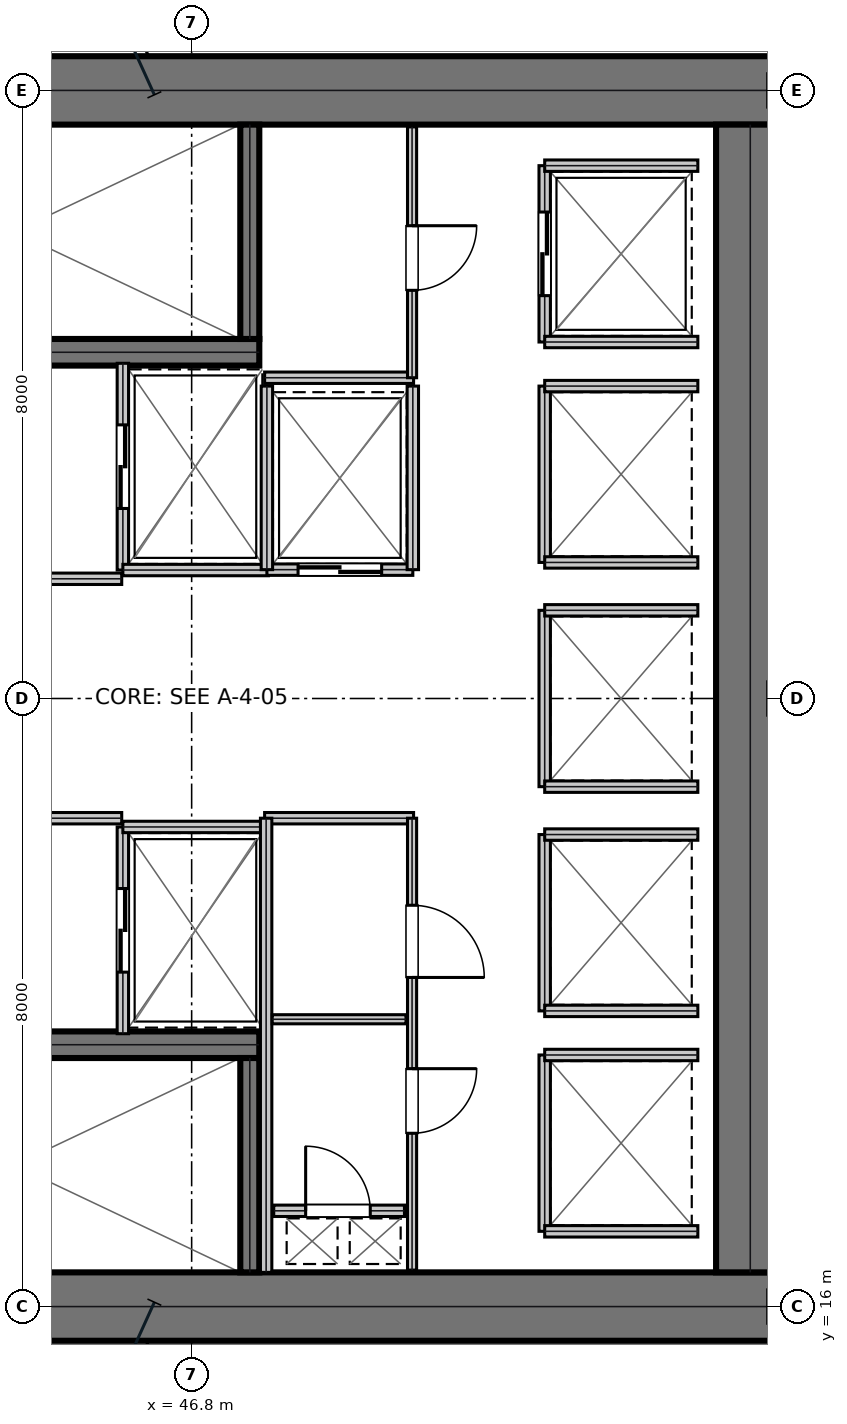
"""IFC4 building model, lengths in metres.
Left out: names, types, materials, properties, quantities, classifications, styles, units other than length and angle.
Written with IfcOpenShell. Run it as: python <this file> out.ifc"""

import sys

from ifc_helpers import new_model, si_unit, direction, frame, frame_2d, origin, place, context, subcontext, project, spatial, rectangle, extrude, element, fill, save


model = new_model("IFC4")
c1 = context("Model", 3, precision=1e-05, world=origin(), true_north=direction((0.0, 1.0)))
c2 = subcontext(c1, "Body", "Model", "MODEL_VIEW")
j1 = project(units=[si_unit("LENGTHUNIT", "METRE"), si_unit("PLANEANGLEUNIT", "RADIAN")], contexts=[c1])
p1 = place(None, origin())
s1 = spatial("IfcSite", under=j1, at=p1, CompositionType="ELEMENT")
p2 = place(p1, origin())
s2 = spatial("IfcBuilding", under=s1, at=p2, CompositionType="ELEMENT")
p3 = place(p2, frame((0.0, 0.0, 102.6)))
s3 = spatial("IfcBuildingStorey", under=s2, at=p3, CompositionType="ELEMENT", Elevation=102.6)
for number, where, z_axis, x_axis in (
    (1, (38.8, 32.0, 0.0), (0.0, 0.0, 1.0), (1.0, 0.0, 0.0)),
    (2, (38.8, 16.0, 0.0), (0.0, 0.0, 1.0), (1.0, 0.0, 0.0)),
):
    element("IfcWall", number, at=place(p3, frame(where, z_axis=z_axis, x_axis=x_axis)), inside=s3, PredefinedType="SHEAR", context=c2, shape_type="SweptSolid", body=[
        extrude(rectangle(XDim=16.0, YDim=0.9, at=frame_2d((8.0, 0.0))), origin(), (0.0, 0.0, 1.0), 3.73),
    ])
p4 = place(p3, frame((54.15, 16.45, 0.0), z_axis=(0.0, 0.0, 1.0), x_axis=(0.0, 1.0, 0.0)))
e3 = element("IfcWall", 3, at=p4, inside=s3, PredefinedType="SHEAR", context=c2, shape_type="SweptSolid", body=[
    extrude(rectangle(XDim=15.1, YDim=0.9, at=frame_2d((7.55, 0.0))), origin(), (0.0, 0.0, 1.0), 3.73),
])
p5 = place(p3, frame((39.98, 28.555, 0.0), z_axis=(0.0, 0.0, 1.0), x_axis=(1.0, 0.0, 0.0)))
e4 = element("IfcWall", 4, at=p5, inside=s3, PredefinedType="SHEAR", context=c2, shape_type="SweptSolid", body=[
    extrude(rectangle(XDim=7.71, YDim=0.35, at=frame_2d((3.855, 0.0))), origin(), (0.0, 0.0, 1.0), 3.73),
])
p6 = place(p5, frame((0.25, 0.0, 0.0)))
e5 = element("IfcOpeningElement", 5, at=p6, cuts=e4, PredefinedType="OPENING", context=c2, shape_type="SweptSolid", body=[
    extrude(rectangle(XDim=1.1, YDim=2.15, at=frame_2d((0.55, 1.075))), frame((0.0, 0.185, 0.0), z_axis=(0.0, -1.0, 0.0), x_axis=(1.0, 0.0, 0.0)), (0.0, 0.0, 1.0), 0.37),
])
p7 = place(p3, frame((39.98, 19.445, 0.0), z_axis=(0.0, 0.0, 1.0), x_axis=(1.0, 0.0, 0.0)))
e6 = element("IfcWall", 6, at=p7, inside=s3, PredefinedType="SHEAR", context=c2, shape_type="SweptSolid", body=[
    extrude(rectangle(XDim=7.71, YDim=0.35, at=frame_2d((3.855, 0.0))), origin(), (0.0, 0.0, 1.0), 3.73),
])
p8 = place(p7, frame((0.25, 0.0, 0.0)))
e7 = element("IfcOpeningElement", 7, at=p8, cuts=e6, PredefinedType="OPENING", context=c2, shape_type="SweptSolid", body=[
    extrude(rectangle(XDim=1.1, YDim=2.15, at=frame_2d((0.55, 1.075))), frame((0.0, 0.185, 0.0), z_axis=(0.0, -1.0, 0.0), x_axis=(1.0, 0.0, 0.0)), (0.0, 0.0, 1.0), 0.37),
])
for number, where, z_axis, x_axis in (
    (8, (47.565, 28.73, 0.0), (0.0, 0.0, 1.0), (0.0, 1.0, 0.0)),
    (9, (47.565, 16.45, 0.0), (0.0, 0.0, 1.0), (0.0, 1.0, 0.0)),
):
    element("IfcWall", number, at=place(p3, frame(where, z_axis=z_axis, x_axis=x_axis)), inside=s3, PredefinedType="SHEAR", context=c2, shape_type="SweptSolid", body=[
        extrude(rectangle(XDim=2.82, YDim=0.25, at=frame_2d((1.41, 0.0))), origin(), (0.0, 0.0, 1.0), 3.73),
    ])
p9 = place(p3, frame((39.98, 25.575, 0.0), z_axis=(0.0, 0.0, 1.0), x_axis=(1.0, 0.0, 0.0)))
e10 = element("IfcWall", 10, at=p9, inside=s3, PredefinedType="PARTITIONING", context=c2, shape_type="SweptSolid", body=[
    extrude(rectangle(XDim=5.9, YDim=0.15, at=frame_2d((2.95, 0.0))), origin(), (0.0, 0.0, 1.0), 3.73),
])
p10 = place(p9, frame((2.35, 0.0, 0.0)))
e11 = element("IfcOpeningElement", 11, at=p10, cuts=e10, PredefinedType="OPENING", context=c2, shape_type="SweptSolid", body=[
    extrude(rectangle(XDim=1.05, YDim=2.15, at=frame_2d((0.525, 1.075))), frame((0.0, 0.085, 0.0), z_axis=(0.0, -1.0, 0.0), x_axis=(1.0, 0.0, 0.0)), (0.0, 0.0, 1.0), 0.17),
])
p11 = place(p3, frame((39.98, 22.425, 0.0), z_axis=(0.0, 0.0, 1.0), x_axis=(1.0, 0.0, 0.0)))
e12 = element("IfcWall", 12, at=p11, inside=s3, PredefinedType="PARTITIONING", context=c2, shape_type="SweptSolid", body=[
    extrude(rectangle(XDim=5.9, YDim=0.15, at=frame_2d((2.95, 0.0))), origin(), (0.0, 0.0, 1.0), 3.73),
])
p12 = place(p11, frame((2.35, 0.0, 0.0)))
e13 = element("IfcOpeningElement", 13, at=p12, cuts=e12, PredefinedType="OPENING", context=c2, shape_type="SweptSolid", body=[
    extrude(rectangle(XDim=1.05, YDim=2.15, at=frame_2d((0.525, 1.075))), frame((0.0, 0.085, 0.0), z_axis=(0.0, -1.0, 0.0), x_axis=(1.0, 0.0, 0.0)), (0.0, 0.0, 1.0), 0.17),
])
p13 = place(p3, frame((45.895, 25.69, 0.0), z_axis=(0.0, 0.0, 1.0), x_axis=(0.0, 1.0, 0.0)))
e14 = element("IfcWall", 14, at=p13, inside=s3, PredefinedType="PARTITIONING", context=c2, shape_type="SweptSolid", body=[
    extrude(rectangle(XDim=2.72, YDim=0.15, at=frame_2d((1.36, 0.0))), origin(), (0.0, 0.0, 1.0), 3.73),
])
p14 = place(p13, frame((0.81, 0.0, 0.0)))
e15 = element("IfcOpeningElement", 15, at=p14, cuts=e14, PredefinedType="OPENING", context=c2, shape_type="SweptSolid", body=[
    extrude(rectangle(XDim=1.1, YDim=2.15, at=frame_2d((0.55, 1.075))), frame((0.0, 0.085, 0.0), z_axis=(0.0, -1.0, 0.0), x_axis=(1.0, 0.0, 0.0)), (0.0, 0.0, 1.0), 0.17),
])
p15 = place(p3, frame((45.895, 25.69, 0.0), z_axis=(0.0, 0.0, 1.0), x_axis=(1.0, 0.0, 0.0)))
e16 = element("IfcWall", 16, at=p15, inside=s3, PredefinedType="PARTITIONING", context=c2, shape_type="SweptSolid", body=[
    extrude(rectangle(XDim=1.915, YDim=0.15, at=frame_2d((0.958, 0.0))), origin(), (0.0, 0.0, 1.0), 3.73),
])
p16 = place(p3, frame((45.895, 19.59, 0.0), z_axis=(0.0, 0.0, 1.0), x_axis=(0.0, 1.0, 0.0)))
e17 = element("IfcWall", 17, at=p16, inside=s3, PredefinedType="PARTITIONING", context=c2, shape_type="SweptSolid", body=[
    extrude(rectangle(XDim=2.72, YDim=0.15, at=frame_2d((1.36, 0.0))), origin(), (0.0, 0.0, 1.0), 3.73),
])
p17 = place(p16, frame((0.81, 0.0, 0.0)))
e18 = element("IfcOpeningElement", 18, at=p17, cuts=e17, PredefinedType="OPENING", context=c2, shape_type="SweptSolid", body=[
    extrude(rectangle(XDim=1.1, YDim=2.15, at=frame_2d((0.55, 1.075))), frame((0.0, 0.085, 0.0), z_axis=(0.0, -1.0, 0.0), x_axis=(1.0, 0.0, 0.0)), (0.0, 0.0, 1.0), 0.17),
])
p18 = place(p3, frame((45.895, 22.31, 0.0), z_axis=(0.0, 0.0, 1.0), x_axis=(1.0, 0.0, 0.0)))
e19 = element("IfcWall", 19, at=p18, inside=s3, PredefinedType="PARTITIONING", context=c2, shape_type="SweptSolid", body=[
    extrude(rectangle(XDim=1.915, YDim=0.15, at=frame_2d((0.958, 0.0))), origin(), (0.0, 0.0, 1.0), 3.73),
])
p19 = place(p3, frame((47.79, 25.695, 0.0), z_axis=(0.0, 0.0, 1.0), x_axis=(1.0, 0.0, 0.0)))
e20 = element("IfcWall", 20, at=p19, inside=s3, PredefinedType="PARTITIONING", context=c2, shape_type="SweptSolid", body=[
    extrude(rectangle(XDim=1.92, YDim=0.15, at=frame_2d((0.96, 0.0))), origin(), (0.0, 0.0, 1.0), 3.73),
])
p20 = place(p19, frame((0.41, 0.0, 0.0)))
e21 = element("IfcOpeningElement", 21, at=p20, cuts=e20, PredefinedType="OPENING", context=c2, shape_type="SweptSolid", body=[
    extrude(rectangle(XDim=1.1, YDim=2.15, at=frame_2d((0.55, 1.075))), frame((0.0, 0.085, 0.0), z_axis=(0.0, -1.0, 0.0), x_axis=(1.0, 0.0, 0.0)), (0.0, 0.0, 1.0), 0.17),
])
for number, where, z_axis, x_axis in (
    (22, (47.79, 25.695, 0.0), (0.0, 0.0, 1.0), (0.0, 1.0, 0.0)),
    (23, (49.71, 25.695, 0.0), (0.0, 0.0, 1.0), (0.0, 1.0, 0.0)),
):
    element("IfcWall", number, at=place(p3, frame(where, z_axis=z_axis, x_axis=x_axis)), inside=s3, PredefinedType="PARTITIONING", context=c2, shape_type="SweptSolid", body=[
        extrude(rectangle(XDim=2.415, YDim=0.15, at=frame_2d((1.208, 0.0))), origin(), (0.0, 0.0, 1.0), 3.73),
    ])
p21 = place(p3, frame((51.445, 28.69, 0.0), z_axis=(0.0, 0.0, 1.0), x_axis=(0.0, 1.0, 0.0)))
e24 = element("IfcWall", 24, at=p21, inside=s3, PredefinedType="PARTITIONING", context=c2, shape_type="SweptSolid", body=[
    extrude(rectangle(XDim=2.32, YDim=0.15, at=frame_2d((1.16, 0.0))), origin(), (0.0, 0.0, 1.0), 3.73),
])
p22 = place(p21, frame((0.61, 0.0, 0.0)))
e25 = element("IfcOpeningElement", 25, at=p22, cuts=e24, PredefinedType="OPENING", context=c2, shape_type="SweptSolid", body=[
    extrude(rectangle(XDim=1.1, YDim=2.15, at=frame_2d((0.55, 1.075))), frame((0.0, 0.085, 0.0), z_axis=(0.0, -1.0, 0.0), x_axis=(1.0, 0.0, 0.0)), (0.0, 0.0, 1.0), 0.17),
])
for number, where, z_axis, x_axis in (
    (26, (51.445, 28.69, 0.0), (0.0, 0.0, 1.0), (1.0, 0.0, 0.0)),
    (27, (51.445, 31.01, 0.0), (0.0, 0.0, 1.0), (1.0, 0.0, 0.0)),
):
    element("IfcWall", number, at=place(p3, frame(where, z_axis=z_axis, x_axis=x_axis)), inside=s3, PredefinedType="PARTITIONING", context=c2, shape_type="SweptSolid", body=[
        extrude(rectangle(XDim=2.015, YDim=0.15, at=frame_2d((1.007, 0.0))), origin(), (0.0, 0.0, 1.0), 3.73),
    ])
p23 = place(p3, frame((51.445, 25.79, 0.0), z_axis=(0.0, 0.0, 1.0), x_axis=(0.0, 1.0, 0.0)))
e28 = element("IfcWall", 28, at=p23, inside=s3, PredefinedType="PARTITIONING", context=c2, shape_type="SweptSolid", body=[
    extrude(rectangle(XDim=2.32, YDim=0.15, at=frame_2d((1.16, 0.0))), origin(), (0.0, 0.0, 1.0), 3.73),
])
for number, where, z_axis, x_axis in (
    (29, (51.445, 25.79, 0.0), (0.0, 0.0, 1.0), (1.0, 0.0, 0.0)),
    (30, (51.445, 28.11, 0.0), (0.0, 0.0, 1.0), (1.0, 0.0, 0.0)),
):
    element("IfcWall", number, at=place(p3, frame(where, z_axis=z_axis, x_axis=x_axis)), inside=s3, PredefinedType="PARTITIONING", context=c2, shape_type="SweptSolid", body=[
        extrude(rectangle(XDim=2.015, YDim=0.15, at=frame_2d((1.007, 0.0))), origin(), (0.0, 0.0, 1.0), 3.73),
    ])
p24 = place(p3, frame((51.445, 19.89, 0.0), z_axis=(0.0, 0.0, 1.0), x_axis=(0.0, 1.0, 0.0)))
e31 = element("IfcWall", 31, at=p24, inside=s3, PredefinedType="PARTITIONING", context=c2, shape_type="SweptSolid", body=[
    extrude(rectangle(XDim=2.32, YDim=0.15, at=frame_2d((1.16, 0.0))), origin(), (0.0, 0.0, 1.0), 3.73),
])
for number, where, z_axis, x_axis in (
    (32, (51.445, 19.89, 0.0), (0.0, 0.0, 1.0), (1.0, 0.0, 0.0)),
    (33, (51.445, 22.21, 0.0), (0.0, 0.0, 1.0), (1.0, 0.0, 0.0)),
):
    element("IfcWall", number, at=place(p3, frame(where, z_axis=z_axis, x_axis=x_axis)), inside=s3, PredefinedType="PARTITIONING", context=c2, shape_type="SweptSolid", body=[
        extrude(rectangle(XDim=2.015, YDim=0.15, at=frame_2d((1.007, 0.0))), origin(), (0.0, 0.0, 1.0), 3.73),
    ])
p25 = place(p3, frame((51.445, 22.84, 0.0), z_axis=(0.0, 0.0, 1.0), x_axis=(0.0, 1.0, 0.0)))
e34 = element("IfcWall", 34, at=p25, inside=s3, PredefinedType="PARTITIONING", context=c2, shape_type="SweptSolid", body=[
    extrude(rectangle(XDim=2.32, YDim=0.15, at=frame_2d((1.16, 0.0))), origin(), (0.0, 0.0, 1.0), 3.73),
])
for number, where, z_axis, x_axis in (
    (35, (51.445, 22.84, 0.0), (0.0, 0.0, 1.0), (1.0, 0.0, 0.0)),
    (36, (51.445, 25.16, 0.0), (0.0, 0.0, 1.0), (1.0, 0.0, 0.0)),
):
    element("IfcWall", number, at=place(p3, frame(where, z_axis=z_axis, x_axis=x_axis)), inside=s3, PredefinedType="PARTITIONING", context=c2, shape_type="SweptSolid", body=[
        extrude(rectangle(XDim=2.015, YDim=0.15, at=frame_2d((1.007, 0.0))), origin(), (0.0, 0.0, 1.0), 3.73),
    ])
p26 = place(p3, frame((51.445, 16.99, 0.0), z_axis=(0.0, 0.0, 1.0), x_axis=(0.0, 1.0, 0.0)))
e37 = element("IfcWall", 37, at=p26, inside=s3, PredefinedType="PARTITIONING", context=c2, shape_type="SweptSolid", body=[
    extrude(rectangle(XDim=2.32, YDim=0.15, at=frame_2d((1.16, 0.0))), origin(), (0.0, 0.0, 1.0), 3.73),
])
for number, where, z_axis, x_axis in (
    (38, (51.445, 16.99, 0.0), (0.0, 0.0, 1.0), (1.0, 0.0, 0.0)),
    (39, (51.445, 19.31, 0.0), (0.0, 0.0, 1.0), (1.0, 0.0, 0.0)),
):
    element("IfcWall", number, at=place(p3, frame(where, z_axis=z_axis, x_axis=x_axis)), inside=s3, PredefinedType="PARTITIONING", context=c2, shape_type="SweptSolid", body=[
        extrude(rectangle(XDim=2.015, YDim=0.15, at=frame_2d((1.007, 0.0))), origin(), (0.0, 0.0, 1.0), 3.73),
    ])
p27 = place(p3, frame((47.88, 17.26, 0.0), z_axis=(0.0, 0.0, 1.0), x_axis=(1.0, 0.0, 0.0)))
e40 = element("IfcWall", 40, at=p27, inside=s3, PredefinedType="PARTITIONING", context=c2, shape_type="SweptSolid", body=[
    extrude(rectangle(XDim=1.72, YDim=0.15, at=frame_2d((0.86, 0.0))), origin(), (0.0, 0.0, 1.0), 3.73),
])
p28 = place(p27, frame((0.42, 0.0, 0.0)))
e41 = element("IfcOpeningElement", 41, at=p28, cuts=e40, PredefinedType="OPENING", context=c2, shape_type="SweptSolid", body=[
    extrude(rectangle(XDim=0.85, YDim=2.15, at=frame_2d((0.425, 1.075))), frame((0.0, 0.085, 0.0), z_axis=(0.0, -1.0, 0.0), x_axis=(1.0, 0.0, 0.0)), (0.0, 0.0, 1.0), 0.17),
])
p29 = place(p3, frame((47.76, 22.425, 0.0), z_axis=(0.0, 0.0, 1.0), x_axis=(1.0, 0.0, 0.0)))
e42 = element("IfcWall", 42, at=p29, inside=s3, PredefinedType="PARTITIONING", context=c2, shape_type="SweptSolid", body=[
    extrude(rectangle(XDim=1.96, YDim=0.15, at=frame_2d((0.98, 0.0))), origin(), (0.0, 0.0, 1.0), 3.73),
])
p30 = place(p3, frame((47.78, 16.45, 0.0), z_axis=(0.0, 0.0, 1.0), x_axis=(0.0, 1.0, 0.0)))
e43 = element("IfcWall", 43, at=p30, inside=s3, PredefinedType="PARTITIONING", context=c2, shape_type="SweptSolid", body=[
    extrude(rectangle(XDim=5.975, YDim=0.15, at=frame_2d((2.988, 0.0))), origin(), (0.0, 0.0, 1.0), 3.73),
])
p31 = place(p3, frame((47.86, 19.78, 0.0), z_axis=(0.0, 0.0, 1.0), x_axis=(1.0, 0.0, 0.0)))
e44 = element("IfcWall", 44, at=p31, inside=s3, PredefinedType="PARTITIONING", context=c2, shape_type="SweptSolid", body=[
    extrude(rectangle(XDim=1.76, YDim=0.12, at=frame_2d((0.88, 0.0))), origin(), (0.0, 0.0, 1.0), 3.73),
])
p32 = place(p3, frame((49.7, 16.48, 0.0), z_axis=(0.0, 0.0, 1.0), x_axis=(0.0, 1.0, 0.0)))
e45 = element("IfcWall", 45, at=p32, inside=s3, PredefinedType="PARTITIONING", context=c2, shape_type="SweptSolid", body=[
    extrude(rectangle(XDim=5.945, YDim=0.12, at=frame_2d((2.973, 0.0))), origin(), (0.0, 0.0, 1.0), 3.73),
])
p33 = place(p32, frame((1.8, 0.0, 0.0)))
e46 = element("IfcOpeningElement", 46, at=p33, cuts=e45, PredefinedType="OPENING", context=c2, shape_type="SweptSolid", body=[
    extrude(rectangle(XDim=0.85, YDim=2.15, at=frame_2d((0.425, 1.075))), frame((0.0, 0.07, 0.0), z_axis=(0.0, -1.0, 0.0), x_axis=(1.0, 0.0, 0.0)), (0.0, 0.0, 1.0), 0.14),
])
p34 = place(p32, frame((3.85, 0.0, 0.0)))
e47 = element("IfcOpeningElement", 47, at=p34, cuts=e45, PredefinedType="OPENING", context=c2, shape_type="SweptSolid", body=[
    extrude(rectangle(XDim=0.95, YDim=2.15, at=frame_2d((0.475, 1.075))), frame((0.0, 0.07, 0.0), z_axis=(0.0, -1.0, 0.0), x_axis=(1.0, 0.0, 0.0)), (0.0, 0.0, 1.0), 0.14),
])
p35 = place(p3, frame((47.76, 28.22, 0.0), z_axis=(0.0, 0.0, 1.0), x_axis=(1.0, 0.0, 0.0)))
e48 = element("IfcWall", 48, at=p35, inside=s3, PredefinedType="PARTITIONING", context=c2, shape_type="SweptSolid", body=[
    extrude(rectangle(XDim=1.96, YDim=0.15, at=frame_2d((0.98, 0.0))), origin(), (0.0, 0.0, 1.0), 3.73),
])
p36 = place(p3, frame((49.7, 28.22, 0.0), z_axis=(0.0, 0.0, 1.0), x_axis=(0.0, 1.0, 0.0)))
e49 = element("IfcWall", 49, at=p36, inside=s3, PredefinedType="PARTITIONING", context=c2, shape_type="SweptSolid", body=[
    extrude(rectangle(XDim=3.3, YDim=0.12, at=frame_2d((1.65, 0.0))), origin(), (0.0, 0.0, 1.0), 3.73),
])
p37 = place(p36, frame((1.15, 0.0, 0.0)))
e50 = element("IfcOpeningElement", 50, at=p37, cuts=e49, PredefinedType="OPENING", context=c2, shape_type="SweptSolid", body=[
    extrude(rectangle(XDim=0.85, YDim=2.15, at=frame_2d((0.425, 1.075))), frame((0.0, 0.07, 0.0), z_axis=(0.0, -1.0, 0.0), x_axis=(1.0, 0.0, 0.0)), (0.0, 0.0, 1.0), 0.14),
])
p38 = place(p14, frame((1.1, 0.0, 0.0), z_axis=(0.0, 0.0, 1.0), x_axis=(-1.0, 0.0, 0.0)))
e51 = element("IfcDoor", 51, at=p38, inside=s3, OperationType="DOUBLE_DOOR_SLIDING", PredefinedType="DOOR", context=c2, shape_type="SweptSolid", body=[
    extrude(rectangle(XDim=1.1, YDim=2.15, at=frame_2d((0.55, 1.075))), frame((0.0, 0.025, 0.0), z_axis=(0.0, -1.0, 0.0), x_axis=(1.0, 0.0, 0.0)), (0.0, 0.0, 1.0), 0.05),
])
fill(e15, e51)
p39 = place(p17, frame((1.1, 0.0, 0.0), z_axis=(0.0, 0.0, 1.0), x_axis=(-1.0, 0.0, 0.0)))
e52 = element("IfcDoor", 52, at=p39, inside=s3, OperationType="DOUBLE_DOOR_SLIDING", PredefinedType="DOOR", context=c2, shape_type="SweptSolid", body=[
    extrude(rectangle(XDim=1.1, YDim=2.15, at=frame_2d((0.55, 1.075))), frame((0.0, 0.025, 0.0), z_axis=(0.0, -1.0, 0.0), x_axis=(1.0, 0.0, 0.0)), (0.0, 0.0, 1.0), 0.05),
])
fill(e18, e52)
p40 = place(p20, frame((1.1, 0.0, 0.0), z_axis=(0.0, 0.0, 1.0), x_axis=(-1.0, 0.0, 0.0)))
e53 = element("IfcDoor", 53, at=p40, inside=s3, OperationType="DOUBLE_DOOR_SLIDING", PredefinedType="DOOR", context=c2, shape_type="SweptSolid", body=[
    extrude(rectangle(XDim=1.1, YDim=2.15, at=frame_2d((0.55, 1.075))), frame((0.0, 0.025, 0.0), z_axis=(0.0, -1.0, 0.0), x_axis=(1.0, 0.0, 0.0)), (0.0, 0.0, 1.0), 0.05),
])
fill(e21, e53)
p41 = place(p22, frame((1.1, 0.0, 0.0), z_axis=(0.0, 0.0, 1.0), x_axis=(-1.0, 0.0, 0.0)))
e54 = element("IfcDoor", 54, at=p41, inside=s3, OperationType="DOUBLE_DOOR_SLIDING", PredefinedType="DOOR", context=c2, shape_type="SweptSolid", body=[
    extrude(rectangle(XDim=1.1, YDim=2.15, at=frame_2d((0.55, 1.075))), frame((0.0, 0.025, 0.0), z_axis=(0.0, -1.0, 0.0), x_axis=(1.0, 0.0, 0.0)), (0.0, 0.0, 1.0), 0.05),
])
fill(e25, e54)
p42 = place(p28, origin())
e55 = element("IfcDoor", 55, at=p42, inside=s3, OperationType="SINGLE_SWING_LEFT", PredefinedType="TRAPDOOR", context=c2, shape_type="SweptSolid", body=[
    extrude(rectangle(XDim=0.85, YDim=2.15, at=frame_2d((0.425, 1.075))), frame((0.0, 0.025, 0.0), z_axis=(0.0, -1.0, 0.0), x_axis=(1.0, 0.0, 0.0)), (0.0, 0.0, 1.0), 0.05),
])
fill(e41, e55)
p43 = place(p33, frame((0.85, 0.0, 0.0), z_axis=(0.0, 0.0, 1.0), x_axis=(-1.0, 0.0, 0.0)))
e56 = element("IfcDoor", 56, at=p43, inside=s3, OperationType="SINGLE_SWING_LEFT", PredefinedType="DOOR", context=c2, shape_type="SweptSolid", body=[
    extrude(rectangle(XDim=0.85, YDim=2.15, at=frame_2d((0.425, 1.075))), frame((0.0, 0.025, 0.0), z_axis=(0.0, -1.0, 0.0), x_axis=(1.0, 0.0, 0.0)), (0.0, 0.0, 1.0), 0.05),
])
fill(e46, e56)
p44 = place(p34, frame((0.95, 0.0, 0.0), z_axis=(0.0, 0.0, 1.0), x_axis=(-1.0, 0.0, 0.0)))
e57 = element("IfcDoor", 57, at=p44, inside=s3, OperationType="SINGLE_SWING_RIGHT", PredefinedType="DOOR", context=c2, shape_type="SweptSolid", body=[
    extrude(rectangle(XDim=0.95, YDim=2.15, at=frame_2d((0.475, 1.075))), frame((0.0, 0.025, 0.0), z_axis=(0.0, -1.0, 0.0), x_axis=(1.0, 0.0, 0.0)), (0.0, 0.0, 1.0), 0.05),
])
fill(e47, e57)
p45 = place(p37, frame((0.85, 0.0, 0.0), z_axis=(0.0, 0.0, 1.0), x_axis=(-1.0, 0.0, 0.0)))
e58 = element("IfcDoor", 58, at=p45, inside=s3, OperationType="SINGLE_SWING_LEFT", PredefinedType="DOOR", context=c2, shape_type="SweptSolid", body=[
    extrude(rectangle(XDim=0.85, YDim=2.15, at=frame_2d((0.425, 1.075))), frame((0.0, 0.025, 0.0), z_axis=(0.0, -1.0, 0.0), x_axis=(1.0, 0.0, 0.0)), (0.0, 0.0, 1.0), 0.05),
])
fill(e50, e58)
save(model, sys.argv[1])
